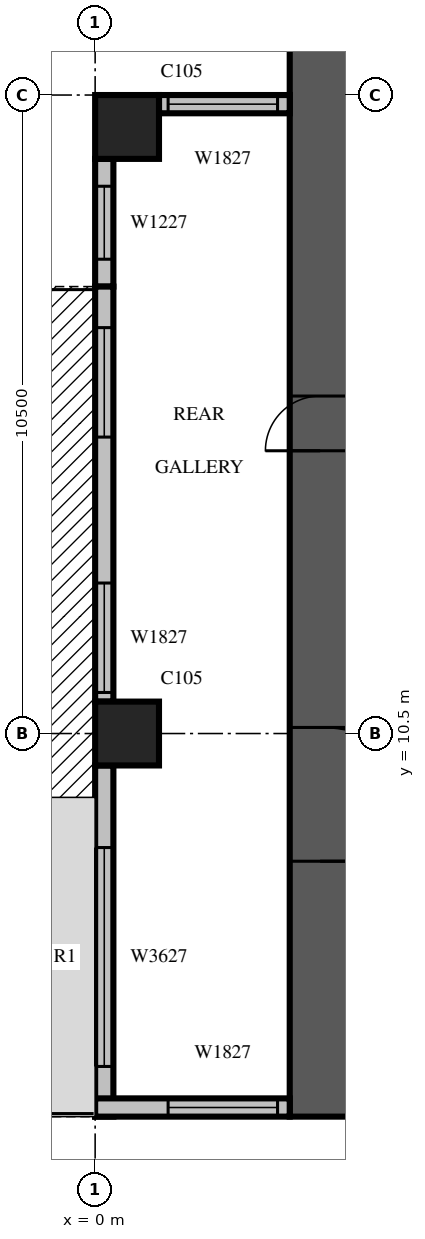
"""IFC4 building model, lengths in metres.
Left out: names, types, materials, properties, quantities, classifications, styles, units other than length and angle.
Written with IfcOpenShell. Run it as: python <this file> out.ifc"""

import sys

from ifc_helpers import new_model, si_unit, direction, frame, frame_2d, origin, origin_2d, place, context, subcontext, project, spatial, rectangle, extrude, source, transform, mapped, element, fill, save


model = new_model("IFC4")
c1 = context("Model", 3, precision=1e-05, world=origin(), true_north=direction((0.0, 1.0)))
c2 = subcontext(c1, "Body", "Model", "MODEL_VIEW")
j1 = project(units=[si_unit("LENGTHUNIT", "METRE"), si_unit("PLANEANGLEUNIT", "RADIAN")], contexts=[c1])
p1 = place(None, origin())
s1 = spatial("IfcSite", under=j1, at=p1, CompositionType="ELEMENT")
p2 = place(p1, origin())
s2 = spatial("IfcBuilding", under=s1, at=p2, CompositionType="ELEMENT")
p3 = place(p2, frame((0.0, 0.0, 153.9)))
s3 = spatial("IfcBuildingStorey", under=s2, at=p3, CompositionType="ELEMENT", Elevation=153.9)
m1 = source(origin(), c2, "Body", "SweptSolid", [
    extrude(rectangle(XDim=1.05, YDim=1.05, at=origin_2d()), origin(), (0.0, 0.0, 1.0), 4.2),
])
for number, where, z_axis, x_axis in (
    (1, (0.525, 10.5, 0.0), (0.0, 0.0, 1.0), (1.0, 0.0, 0.0)),
    (2, (0.525, 20.475, 0.0), (0.0, 0.0, 1.0), (1.0, 0.0, 0.0)),
):
    element("IfcColumn", number, at=place(p3, frame(where, z_axis=z_axis, x_axis=x_axis)), inside=s3, PredefinedType="COLUMN", context=c2, shape_type="MappedRepresentation", body=[
        mapped(m1, transform((0.0, 0.0, 0.0), scale=1.0)),
    ])
m2 = source(origin(), c2, "Body", "SweptSolid", [
    extrude(rectangle(XDim=17.8, YDim=1.0, at=frame_2d((8.9, 0.0))), origin(), (0.0, 0.0, 1.0), 4.2),
])
p4 = place(p3, frame((3.7, 4.2, 0.0), z_axis=(0.0, 0.0, 1.0), x_axis=(0.0, 1.0, 0.0)))
e3 = element("IfcWall", 3, at=p4, inside=s3, PredefinedType="SHEAR", context=c2, shape_type="MappedRepresentation", body=[
    mapped(m2, transform((0.0, 0.0, 0.0), scale=1.0)),
])
m3 = source(origin(), c2, "Body", "SweptSolid", [
    extrude(rectangle(XDim=2.2, YDim=2.1, at=frame_2d((1.1, 1.05))), frame((0.0, 0.51, 0.0), z_axis=(0.0, -1.0, 0.0), x_axis=(1.0, 0.0, 0.0)), (0.0, 0.0, 1.0), 1.02),
])
p5 = place(p4, frame((4.2, 0.0, 0.0)))
e4 = element("IfcOpeningElement", 4, at=p5, cuts=e3, PredefinedType="OPENING", context=c2, shape_type="MappedRepresentation", body=[
    mapped(m3, transform((0.0, 0.0, 0.0), scale=1.0)),
])
m4 = source(origin(), c2, "Body", "SweptSolid", [
    extrude(rectangle(XDim=0.9, YDim=2.1, at=frame_2d((0.45, 1.05))), frame((0.0, 0.51, 0.0), z_axis=(0.0, -1.0, 0.0), x_axis=(1.0, 0.0, 0.0)), (0.0, 0.0, 1.0), 1.02),
])
p6 = place(p4, frame((10.95, 0.0, 0.0)))
e5 = element("IfcOpeningElement", 5, at=p6, cuts=e3, PredefinedType="OPENING", context=c2, shape_type="MappedRepresentation", body=[
    mapped(m4, transform((0.0, 0.0, 0.0), scale=1.0)),
])
m5 = source(origin(), c2, "Body", "SweptSolid", [
    extrude(rectangle(XDim=2.15, YDim=0.3, at=frame_2d((1.075, 0.0))), origin(), (0.0, 0.0, 1.0), 3.8),
])
p7 = place(p3, frame((3.2, 20.85, 0.0), z_axis=(0.0, 0.0, 1.0), x_axis=(-1.0, 0.0, 0.0)))
e6 = element("IfcWall", 6, at=p7, inside=s3, PredefinedType="STANDARD", context=c2, shape_type="MappedRepresentation", body=[
    mapped(m5, transform((0.0, 0.0, 0.0), scale=1.0)),
])
m6 = source(origin(), c2, "Body", "SweptSolid", [
    extrude(rectangle(XDim=1.8, YDim=2.7, at=frame_2d((0.9, 1.35))), frame((0.0, 0.16, 0.0), z_axis=(0.0, -1.0, 0.0), x_axis=(1.0, 0.0, 0.0)), (0.0, 0.0, 1.0), 0.32),
])
p8 = place(p7, frame((0.2, 0.0, 0.6)))
e7 = element("IfcOpeningElement", 7, at=p8, cuts=e6, PredefinedType="OPENING", context=c2, shape_type="MappedRepresentation", body=[
    mapped(m6, transform((0.0, 0.0, 0.0), scale=1.0)),
])
m7 = source(origin(), c2, "Body", "SweptSolid", [
    extrude(rectangle(XDim=2.1, YDim=0.3, at=frame_2d((1.05, 0.0))), origin(), (0.0, 0.0, 1.0), 3.8),
])
p9 = place(p3, frame((0.15, 19.95, 0.0), z_axis=(0.0, 0.0, 1.0), x_axis=(0.0, -1.0, 0.0)))
e8 = element("IfcWall", 8, at=p9, inside=s3, PredefinedType="STANDARD", context=c2, shape_type="MappedRepresentation", body=[
    mapped(m7, transform((0.0, 0.0, 0.0), scale=1.0)),
])
m8 = source(origin(), c2, "Body", "SweptSolid", [
    extrude(rectangle(XDim=1.2, YDim=2.7, at=frame_2d((0.6, 1.35))), frame((0.0, 0.16, 0.0), z_axis=(0.0, -1.0, 0.0), x_axis=(1.0, 0.0, 0.0)), (0.0, 0.0, 1.0), 0.32),
])
p10 = place(p9, frame((0.45, 0.0, 0.6)))
e9 = element("IfcOpeningElement", 9, at=p10, cuts=e8, PredefinedType="OPENING", context=c2, shape_type="MappedRepresentation", body=[
    mapped(m8, transform((0.0, 0.0, 0.0), scale=1.0)),
])
m9 = source(origin(), c2, "Body", "SweptSolid", [
    extrude(rectangle(XDim=6.825, YDim=0.3, at=frame_2d((3.413, 0.0))), origin(), (0.0, 0.0, 1.0), 3.8),
])
p11 = place(p3, frame((0.15, 17.85, 0.0), z_axis=(0.0, 0.0, 1.0), x_axis=(0.0, -1.0, 0.0)))
e10 = element("IfcWall", 10, at=p11, inside=s3, PredefinedType="STANDARD", context=c2, shape_type="MappedRepresentation", body=[
    mapped(m9, transform((0.0, 0.0, 0.0), scale=1.0)),
])
m10 = source(origin(), c2, "Body", "SweptSolid", [
    extrude(rectangle(XDim=1.8, YDim=2.4, at=frame_2d((0.9, 1.2))), frame((0.0, 0.16, 0.0), z_axis=(0.0, -1.0, 0.0), x_axis=(1.0, 0.0, 0.0)), (0.0, 0.0, 1.0), 0.32),
])
p12 = place(p11, frame((0.675, 0.0, 0.0)))
e11 = element("IfcOpeningElement", 11, at=p12, cuts=e10, PredefinedType="OPENING", context=c2, shape_type="MappedRepresentation", body=[
    mapped(m10, transform((0.0, 0.0, 0.0), scale=1.0)),
])
p13 = place(p11, frame((4.875, 0.0, 0.6)))
e12 = element("IfcOpeningElement", 12, at=p13, cuts=e10, PredefinedType="OPENING", context=c2, shape_type="MappedRepresentation", body=[
    mapped(m6, transform((0.0, 0.0, 0.0), scale=1.0)),
])
m11 = source(origin(), c2, "Body", "SweptSolid", [
    extrude(rectangle(XDim=5.775, YDim=0.3, at=frame_2d((2.888, 0.0))), origin(), (0.0, 0.0, 1.0), 3.8),
])
p14 = place(p3, frame((0.15, 9.975, 0.0), z_axis=(0.0, 0.0, 1.0), x_axis=(0.0, -1.0, 0.0)))
e13 = element("IfcWall", 13, at=p14, inside=s3, PredefinedType="STANDARD", context=c2, shape_type="MappedRepresentation", body=[
    mapped(m11, transform((0.0, 0.0, 0.0), scale=1.0)),
])
m12 = source(origin(), c2, "Body", "SweptSolid", [
    extrude(rectangle(XDim=3.6, YDim=2.7, at=frame_2d((1.8, 1.35))), frame((0.0, 0.16, 0.0), z_axis=(0.0, -1.0, 0.0), x_axis=(1.0, 0.0, 0.0)), (0.0, 0.0, 1.0), 0.32),
])
p15 = place(p14, frame((1.35, 0.0, 0.6)))
e14 = element("IfcOpeningElement", 14, at=p15, cuts=e13, PredefinedType="OPENING", context=c2, shape_type="MappedRepresentation", body=[
    mapped(m12, transform((0.0, 0.0, 0.0), scale=1.0)),
])
m13 = source(origin(), c2, "Body", "SweptSolid", [
    extrude(rectangle(XDim=3.2, YDim=0.3, at=frame_2d((1.6, 0.0))), origin(), (0.0, 0.0, 1.0), 3.8),
])
p16 = place(p3, frame((0.0, 4.35, 0.0), z_axis=(0.0, 0.0, 1.0), x_axis=(1.0, 0.0, 0.0)))
e15 = element("IfcWall", 15, at=p16, inside=s3, PredefinedType="STANDARD", context=c2, shape_type="MappedRepresentation", body=[
    mapped(m13, transform((0.0, 0.0, 0.0), scale=1.0)),
])
p17 = place(p16, frame((1.2, 0.0, 0.6)))
e16 = element("IfcOpeningElement", 16, at=p17, cuts=e15, PredefinedType="OPENING", context=c2, shape_type="MappedRepresentation", body=[
    mapped(m6, transform((0.0, 0.0, 0.0), scale=1.0)),
])
m14 = source(origin(), c2, "Body", "SweptSolid", [
    extrude(rectangle(XDim=1.8, YDim=2.7, at=frame_2d((0.9, 1.35))), frame((0.0, 0.03, 0.0), z_axis=(0.0, -1.0, 0.0), x_axis=(1.0, 0.0, 0.0)), (0.0, 0.0, 1.0), 0.06),
])
p18 = place(p8, origin())
e17 = element("IfcWindow", 17, at=p18, inside=s3, PartitioningType="SINGLE_PANEL", PredefinedType="WINDOW", context=c2, shape_type="MappedRepresentation", body=[
    mapped(m14, transform((0.0, 0.0, 0.0), scale=1.0)),
])
fill(e7, e17)
m15 = source(origin(), c2, "Body", "SweptSolid", [
    extrude(rectangle(XDim=1.2, YDim=2.7, at=frame_2d((0.6, 1.35))), frame((0.0, 0.03, 0.0), z_axis=(0.0, -1.0, 0.0), x_axis=(1.0, 0.0, 0.0)), (0.0, 0.0, 1.0), 0.06),
])
p19 = place(p10, origin())
e18 = element("IfcWindow", 18, at=p19, inside=s3, PartitioningType="SINGLE_PANEL", PredefinedType="WINDOW", context=c2, shape_type="MappedRepresentation", body=[
    mapped(m15, transform((0.0, 0.0, 0.0), scale=1.0)),
])
fill(e9, e18)
m16 = source(origin(), c2, "Body", "SweptSolid", [
    extrude(rectangle(XDim=1.8, YDim=2.4, at=frame_2d((0.9, 1.2))), frame((0.0, 0.025, 0.0), z_axis=(0.0, -1.0, 0.0), x_axis=(1.0, 0.0, 0.0)), (0.0, 0.0, 1.0), 0.05),
])
p20 = place(p12, origin())
e19 = element("IfcDoor", 19, at=p20, inside=s3, OperationType="SLIDING_TO_LEFT", PredefinedType="DOOR", context=c2, shape_type="MappedRepresentation", body=[
    mapped(m16, transform((0.0, 0.0, 0.0), scale=1.0)),
])
fill(e11, e19)
p21 = place(p13, origin())
e20 = element("IfcWindow", 20, at=p21, inside=s3, PartitioningType="SINGLE_PANEL", PredefinedType="WINDOW", context=c2, shape_type="MappedRepresentation", body=[
    mapped(m14, transform((0.0, 0.0, 0.0), scale=1.0)),
])
fill(e12, e20)
m17 = source(origin(), c2, "Body", "SweptSolid", [
    extrude(rectangle(XDim=3.6, YDim=2.7, at=frame_2d((1.8, 1.35))), frame((0.0, 0.03, 0.0), z_axis=(0.0, -1.0, 0.0), x_axis=(1.0, 0.0, 0.0)), (0.0, 0.0, 1.0), 0.06),
])
p22 = place(p15, origin())
e21 = element("IfcWindow", 21, at=p22, inside=s3, PartitioningType="SINGLE_PANEL", PredefinedType="WINDOW", context=c2, shape_type="MappedRepresentation", body=[
    mapped(m17, transform((0.0, 0.0, 0.0), scale=1.0)),
])
fill(e14, e21)
p23 = place(p17, origin())
e22 = element("IfcWindow", 22, at=p23, inside=s3, PartitioningType="SINGLE_PANEL", PredefinedType="WINDOW", context=c2, shape_type="MappedRepresentation", body=[
    mapped(m14, transform((0.0, 0.0, 0.0), scale=1.0)),
])
fill(e16, e22)
m18 = source(origin(), c2, "Body", "SweptSolid", [
    extrude(rectangle(XDim=2.2, YDim=2.1, at=frame_2d((1.1, 1.05))), frame((0.0, 0.025, 0.0), z_axis=(0.0, -1.0, 0.0), x_axis=(1.0, 0.0, 0.0)), (0.0, 0.0, 1.0), 0.05),
])
p24 = place(p5, origin())
e23 = element("IfcDoor", 23, at=p24, inside=s3, OperationType="DOUBLE_DOOR_SINGLE_SWING", PredefinedType="DOOR", context=c2, shape_type="MappedRepresentation", body=[
    mapped(m18, transform((0.0, 0.0, 0.0), scale=1.0)),
])
fill(e4, e23)
m19 = source(origin(), c2, "Body", "SweptSolid", [
    extrude(rectangle(XDim=0.9, YDim=2.1, at=frame_2d((0.45, 1.05))), frame((0.0, 0.025, 0.0), z_axis=(0.0, -1.0, 0.0), x_axis=(1.0, 0.0, 0.0)), (0.0, 0.0, 1.0), 0.05),
])
p25 = place(p6, origin())
e24 = element("IfcDoor", 24, at=p25, inside=s3, OperationType="SINGLE_SWING_LEFT", PredefinedType="DOOR", context=c2, shape_type="MappedRepresentation", body=[
    mapped(m19, transform((0.0, 0.0, 0.0), scale=1.0)),
])
fill(e5, e24)
save(model, sys.argv[1])
